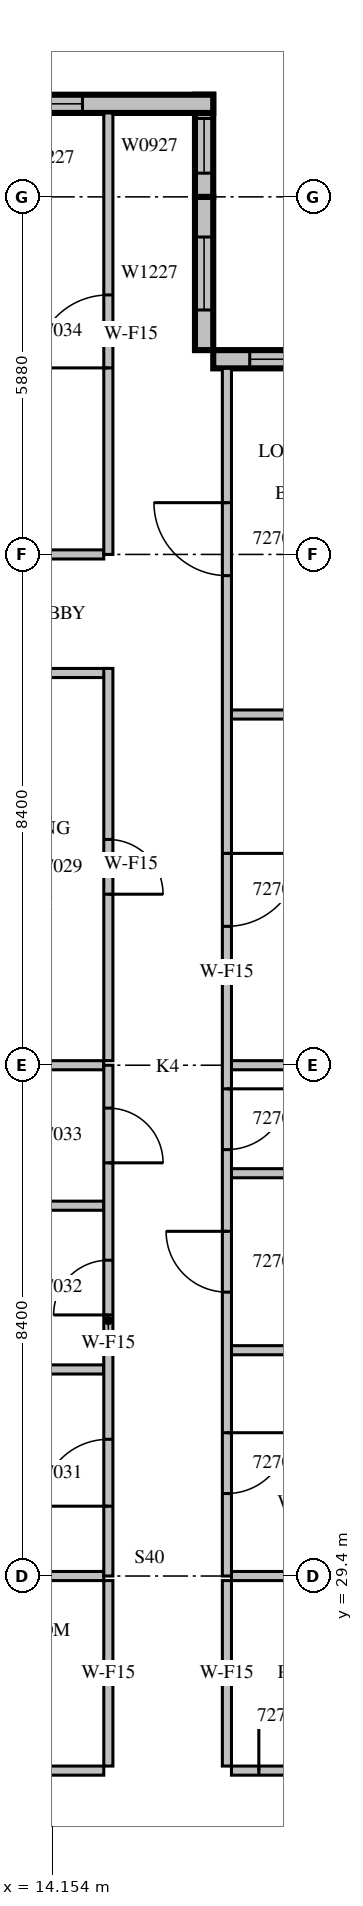
"""IFC4 building model, lengths in metres.
Left out: names, types, materials, properties, quantities, classifications, styles, units other than length and angle.
Written with IfcOpenShell. Run it as: python <this file> out.ifc"""

import sys

from ifc_helpers import new_model, si_unit, direction, frame, frame_2d, origin, place, context, subcontext, project, spatial, rectangle, extrude, source, transform, mapped, element, fill, save


model = new_model("IFC4")
c1 = context("Model", 3, precision=1e-05, world=origin(), true_north=direction((0.0, 1.0)))
c2 = subcontext(c1, "Body", "Model", "MODEL_VIEW")
j1 = project(units=[si_unit("LENGTHUNIT", "METRE"), si_unit("PLANEANGLEUNIT", "RADIAN")], contexts=[c1])
p1 = place(None, origin())
s1 = spatial("IfcSite", under=j1, at=p1, CompositionType="ELEMENT")
p2 = place(p1, origin())
s2 = spatial("IfcBuilding", under=s1, at=p2, CompositionType="ELEMENT")
p3 = place(p2, frame((0.0, 0.0, 124.5)))
s3 = spatial("IfcBuildingStorey", under=s2, at=p3, CompositionType="ELEMENT", Elevation=124.5)
m1 = source(origin(), c2, "Body", "SweptSolid", [
    extrude(rectangle(XDim=4.2, YDim=0.3, at=frame_2d((2.1, 0.0))), origin(), (0.0, 0.0, 1.0), 3.8),
])
p4 = place(p3, frame((21.0, 49.41, 0.0), z_axis=(0.0, 0.0, 1.0), x_axis=(-1.0, 0.0, 0.0)))
e1 = element("IfcWall", 1, at=p4, inside=s3, PredefinedType="STANDARD", context=c2, shape_type="MappedRepresentation", body=[
    mapped(m1, transform((0.0, 0.0, 0.0), scale=1.0)),
])
m2 = source(origin(), c2, "Body", "SweptSolid", [
    extrude(rectangle(XDim=3.0, YDim=2.7, at=frame_2d((1.5, 1.35))), frame((0.0, 0.16, 0.0), z_axis=(0.0, -1.0, 0.0), x_axis=(1.0, 0.0, 0.0)), (0.0, 0.0, 1.0), 0.32),
])
p5 = place(p4, frame((0.6, 0.0, 0.6)))
e2 = element("IfcOpeningElement", 2, at=p5, cuts=e1, PredefinedType="OPENING", context=c2, shape_type="MappedRepresentation", body=[
    mapped(m2, transform((0.0, 0.0, 0.0), scale=1.0)),
])
m3 = source(origin(), c2, "Body", "SweptSolid", [
    extrude(rectangle(XDim=2.52, YDim=0.3, at=frame_2d((1.26, 0.0))), origin(), (0.0, 0.0, 1.0), 3.8),
])
p6 = place(p3, frame((16.65, 49.56, 0.0), z_axis=(0.0, 0.0, 1.0), x_axis=(0.0, 1.0, 0.0)))
e3 = element("IfcWall", 3, at=p6, inside=s3, PredefinedType="STANDARD", context=c2, shape_type="MappedRepresentation", body=[
    mapped(m3, transform((0.0, 0.0, 0.0), scale=1.0)),
])
m4 = source(origin(), c2, "Body", "SweptSolid", [
    extrude(rectangle(XDim=1.2, YDim=2.7, at=frame_2d((0.6, 1.35))), frame((0.0, 0.16, 0.0), z_axis=(0.0, -1.0, 0.0), x_axis=(1.0, 0.0, 0.0)), (0.0, 0.0, 1.0), 0.32),
])
p7 = place(p6, frame((0.66, 0.0, 0.6)))
e4 = element("IfcOpeningElement", 4, at=p7, cuts=e3, PredefinedType="OPENING", context=c2, shape_type="MappedRepresentation", body=[
    mapped(m4, transform((0.0, 0.0, 0.0), scale=1.0)),
])
m5 = source(origin(), c2, "Body", "SweptSolid", [
    extrude(rectangle(XDim=1.68, YDim=0.3, at=frame_2d((0.84, 0.0))), origin(), (0.0, 0.0, 1.0), 3.8),
])
p8 = place(p3, frame((16.65, 52.08, 0.0), z_axis=(0.0, 0.0, 1.0), x_axis=(0.0, 1.0, 0.0)))
e5 = element("IfcWall", 5, at=p8, inside=s3, PredefinedType="STANDARD", context=c2, shape_type="MappedRepresentation", body=[
    mapped(m5, transform((0.0, 0.0, 0.0), scale=1.0)),
])
m6 = source(origin(), c2, "Body", "SweptSolid", [
    extrude(rectangle(XDim=0.9, YDim=2.7, at=frame_2d((0.45, 1.35))), frame((0.0, 0.16, 0.0), z_axis=(0.0, -1.0, 0.0), x_axis=(1.0, 0.0, 0.0)), (0.0, 0.0, 1.0), 0.32),
])
p9 = place(p8, frame((0.39, 0.0, 0.6)))
e6 = element("IfcOpeningElement", 6, at=p9, cuts=e5, PredefinedType="OPENING", context=c2, shape_type="MappedRepresentation", body=[
    mapped(m6, transform((0.0, 0.0, 0.0), scale=1.0)),
])
m7 = source(origin(), c2, "Body", "SweptSolid", [
    extrude(rectangle(XDim=10.5, YDim=0.3, at=frame_2d((5.25, 0.0))), origin(), (0.0, 0.0, 1.0), 3.8),
])
p10 = place(p3, frame((16.8, 53.61, 0.0), z_axis=(0.0, 0.0, 1.0), x_axis=(-1.0, 0.0, 0.0)))
e7 = element("IfcWall", 7, at=p10, inside=s3, PredefinedType="STANDARD", context=c2, shape_type="MappedRepresentation", body=[
    mapped(m7, transform((0.0, 0.0, 0.0), scale=1.0)),
])
p11 = place(p10, frame((2.15, 0.0, 0.6)))
e8 = element("IfcOpeningElement", 8, at=p11, cuts=e7, PredefinedType="OPENING", context=c2, shape_type="MappedRepresentation", body=[
    mapped(m4, transform((0.0, 0.0, 0.0), scale=1.0)),
])
m8 = source(origin(), c2, "Body", "SweptSolid", [
    extrude(rectangle(XDim=1.8, YDim=2.7, at=frame_2d((0.9, 1.35))), frame((0.0, 0.16, 0.0), z_axis=(0.0, -1.0, 0.0), x_axis=(1.0, 0.0, 0.0)), (0.0, 0.0, 1.0), 0.32),
])
p12 = place(p10, frame((8.025, 0.0, 0.6)))
e9 = element("IfcOpeningElement", 9, at=p12, cuts=e7, PredefinedType="OPENING", context=c2, shape_type="MappedRepresentation", body=[
    mapped(m8, transform((0.0, 0.0, 0.0), scale=1.0)),
])
m9 = source(origin(), c2, "Body", "SweptSolid", [
    extrude(rectangle(XDim=4.295, YDim=0.15, at=frame_2d((2.147, 0.0))), origin(), (0.0, 0.0, 1.0), 3.8),
])
p13 = place(p3, frame((10.705, 26.2, 0.0), z_axis=(0.0, 0.0, 1.0), x_axis=(1.0, 0.0, 0.0)))
e10 = element("IfcWall", 10, at=p13, inside=s3, PredefinedType="PARTITIONING", context=c2, shape_type="MappedRepresentation", body=[
    mapped(m9, transform((0.0, 0.0, 0.0), scale=1.0)),
])
m10 = source(origin(), c2, "Body", "SweptSolid", [
    extrude(rectangle(XDim=0.9, YDim=2.1, at=frame_2d((0.45, 1.05))), frame((0.0, 0.085, 0.0), z_axis=(0.0, -1.0, 0.0), x_axis=(1.0, 0.0, 0.0)), (0.0, 0.0, 1.0), 0.17),
])
p14 = place(p13, frame((2.283, 0.0, 0.0)))
e11 = element("IfcOpeningElement", 11, at=p14, cuts=e10, PredefinedType="OPENING", context=c2, shape_type="MappedRepresentation", body=[
    mapped(m10, transform((0.0, 0.0, 0.0), scale=1.0)),
])
m11 = source(origin(), c2, "Body", "SweptSolid", [
    extrude(rectangle(XDim=3.6, YDim=0.15, at=frame_2d((1.8, 0.0))), origin(), (0.0, 0.0, 1.0), 3.8),
])
p15 = place(p3, frame((17.1, 26.2, 0.0), z_axis=(0.0, 0.0, 1.0), x_axis=(1.0, 0.0, 0.0)))
e12 = element("IfcWall", 12, at=p15, inside=s3, PredefinedType="PARTITIONING", context=c2, shape_type="MappedRepresentation", body=[
    mapped(m11, transform((0.0, 0.0, 0.0), scale=1.0)),
])
p16 = place(p15, frame((0.45, 0.0, 0.0)))
e13 = element("IfcOpeningElement", 13, at=p16, cuts=e12, PredefinedType="OPENING", context=c2, shape_type="MappedRepresentation", body=[
    mapped(m10, transform((0.0, 0.0, 0.0), scale=1.0)),
])
m12 = source(origin(), c2, "Body", "SweptSolid", [
    extrude(rectangle(XDim=3.05, YDim=0.15, at=frame_2d((1.525, 0.0))), origin(), (0.0, 0.0, 1.0), 3.8),
])
for number, where, z_axis, x_axis in (
    (14, (15.075, 26.275, 0.0), (0.0, 0.0, 1.0), (0.0, 1.0, 0.0)),
    (15, (17.025, 29.325, 0.0), (0.0, 0.0, 1.0), (0.0, -1.0, 0.0)),
):
    element("IfcWall", number, at=place(p3, frame(where, z_axis=z_axis, x_axis=x_axis)), inside=s3, PredefinedType="PARTITIONING", context=c2, shape_type="MappedRepresentation", body=[
        mapped(m12, transform((0.0, 0.0, 0.0), scale=1.0)),
    ])
m13 = source(origin(), c2, "Body", "SweptSolid", [
    extrude(rectangle(XDim=3.976, YDim=0.15, at=frame_2d((1.988, 0.0))), origin(), (0.0, 0.0, 1.0), 3.8),
])
p17 = place(p3, frame((15.0, 29.4, 0.0), z_axis=(0.0, 0.0, 1.0), x_axis=(-1.0, 0.0, 0.0)))
e16 = element("IfcWall", 16, at=p17, inside=s3, PredefinedType="PARTITIONING", context=c2, shape_type="MappedRepresentation", body=[
    mapped(m13, transform((0.0, 0.0, 0.0), scale=1.0)),
])
m14 = source(origin(), c2, "Body", "SweptSolid", [
    extrude(rectangle(XDim=2.851, YDim=0.15, at=frame_2d((1.425, 0.0))), origin(), (0.0, 0.0, 1.0), 3.8),
])
p18 = place(p3, frame((19.951, 29.4, 0.0), z_axis=(0.0, 0.0, 1.0), x_axis=(-1.0, 0.0, 0.0)))
e17 = element("IfcWall", 17, at=p18, inside=s3, PredefinedType="PARTITIONING", context=c2, shape_type="MappedRepresentation", body=[
    mapped(m14, transform((0.0, 0.0, 0.0), scale=1.0)),
])
m15 = source(origin(), c2, "Body", "SweptSolid", [
    extrude(rectangle(XDim=2.775, YDim=0.15, at=frame_2d((1.387, 0.0))), origin(), (0.0, 0.0, 1.0), 3.8),
])
p19 = place(p3, frame((15.075, 44.25, 0.0), z_axis=(0.0, 0.0, 1.0), x_axis=(-1.0, 0.0, 0.0)))
e18 = element("IfcWall", 18, at=p19, inside=s3, PredefinedType="PARTITIONING", context=c2, shape_type="MappedRepresentation", body=[
    mapped(m15, transform((0.0, 0.0, 0.0), scale=1.0)),
])
m16 = source(origin(), c2, "Body", "SweptSolid", [
    extrude(rectangle(XDim=6.45, YDim=0.15, at=frame_2d((3.225, 0.0))), origin(), (0.0, 0.0, 1.0), 3.8),
])
p20 = place(p3, frame((15.075, 37.875, 0.0), z_axis=(0.0, 0.0, 1.0), x_axis=(0.0, 1.0, 0.0)))
e19 = element("IfcWall", 19, at=p20, inside=s3, PredefinedType="PARTITIONING", context=c2, shape_type="MappedRepresentation", body=[
    mapped(m16, transform((0.0, 0.0, 0.0), scale=1.0)),
])
p21 = place(p20, frame((2.737, 0.0, 0.0)))
e20 = element("IfcOpeningElement", 20, at=p21, cuts=e19, PredefinedType="OPENING", context=c2, shape_type="MappedRepresentation", body=[
    mapped(m10, transform((0.0, 0.0, 0.0), scale=1.0)),
])
for number, where, z_axis, x_axis in (
    (21, (15.0, 32.797, 0.0), (0.0, 0.0, 1.0), (-1.0, 0.0, 0.0)),
    (22, (15.0, 35.49, 0.0), (0.0, 0.0, 1.0), (-1.0, 0.0, 0.0)),
):
    element("IfcWall", number, at=place(p3, frame(where, z_axis=z_axis, x_axis=x_axis)), inside=s3, PredefinedType="PARTITIONING", context=c2, shape_type="MappedRepresentation", body=[
        mapped(m9, transform((0.0, 0.0, 0.0), scale=1.0)),
    ])
p22 = place(p3, frame((15.0, 37.8, 0.0), z_axis=(0.0, 0.0, 1.0), x_axis=(-1.0, 0.0, 0.0)))
e23 = element("IfcWall", 23, at=p22, inside=s3, PredefinedType="PARTITIONING", context=c2, shape_type="MappedRepresentation", body=[
    mapped(m13, transform((0.0, 0.0, 0.0), scale=1.0)),
])
m17 = source(origin(), c2, "Body", "SweptSolid", [
    extrude(rectangle(XDim=3.825, YDim=0.15, at=frame_2d((1.913, 0.0))), origin(), (0.0, 0.0, 1.0), 3.8),
])
p23 = place(p3, frame((15.0, 46.2, 0.0), z_axis=(0.0, 0.0, 1.0), x_axis=(-1.0, 0.0, 0.0)))
e24 = element("IfcWall", 24, at=p23, inside=s3, PredefinedType="PARTITIONING", context=c2, shape_type="MappedRepresentation", body=[
    mapped(m17, transform((0.0, 0.0, 0.0), scale=1.0)),
])
for number, where, z_axis, x_axis in (
    (25, (17.1, 33.113, 0.0), (0.0, 0.0, 1.0), (1.0, 0.0, 0.0)),
    (26, (17.1, 36.024, 0.0), (0.0, 0.0, 1.0), (1.0, 0.0, 0.0)),
    (27, (17.1, 43.568, 0.0), (0.0, 0.0, 1.0), (1.0, 0.0, 0.0)),
):
    element("IfcWall", number, at=place(p3, frame(where, z_axis=z_axis, x_axis=x_axis)), inside=s3, PredefinedType="PARTITIONING", context=c2, shape_type="MappedRepresentation", body=[
        mapped(m11, transform((0.0, 0.0, 0.0), scale=1.0)),
    ])
p24 = place(p3, frame((19.951, 37.8, 0.0), z_axis=(0.0, 0.0, 1.0), x_axis=(-1.0, 0.0, 0.0)))
e28 = element("IfcWall", 28, at=p24, inside=s3, PredefinedType="PARTITIONING", context=c2, shape_type="MappedRepresentation", body=[
    mapped(m14, transform((0.0, 0.0, 0.0), scale=1.0)),
])
m18 = source(origin(), c2, "Body", "SweptSolid", [
    extrude(rectangle(XDim=8.4, YDim=0.15, at=frame_2d((4.2, 0.0))), origin(), (0.0, 0.0, 1.0), 3.8),
])
p25 = place(p3, frame((15.075, 29.4, 0.0), z_axis=(0.0, 0.0, 1.0), x_axis=(0.0, 1.0, 0.0)))
e29 = element("IfcWall", 29, at=p25, inside=s3, PredefinedType="PARTITIONING", context=c2, shape_type="MappedRepresentation", body=[
    mapped(m18, transform((0.0, 0.0, 0.0), scale=1.0)),
])
m19 = source(origin(), c2, "Body", "SweptSolid", [
    extrude(rectangle(XDim=1.1, YDim=2.1, at=frame_2d((0.55, 1.05))), frame((0.0, 0.085, 0.0), z_axis=(0.0, -1.0, 0.0), x_axis=(1.0, 0.0, 0.0)), (0.0, 0.0, 1.0), 0.17),
])
p26 = place(p25, frame((1.149, 0.0, 0.0)))
e30 = element("IfcOpeningElement", 30, at=p26, cuts=e29, PredefinedType="OPENING", context=c2, shape_type="MappedRepresentation", body=[
    mapped(m19, transform((0.0, 0.0, 0.0), scale=1.0)),
])
p27 = place(p25, frame((4.293, 0.0, 0.0)))
e31 = element("IfcOpeningElement", 31, at=p27, cuts=e29, PredefinedType="OPENING", context=c2, shape_type="MappedRepresentation", body=[
    mapped(m10, transform((0.0, 0.0, 0.0), scale=1.0)),
])
p28 = place(p25, frame((6.795, 0.0, 0.0)))
e32 = element("IfcOpeningElement", 32, at=p28, cuts=e29, PredefinedType="OPENING", context=c2, shape_type="MappedRepresentation", body=[
    mapped(m10, transform((0.0, 0.0, 0.0), scale=1.0)),
])
m20 = source(origin(), c2, "Body", "SweptSolid", [
    extrude(rectangle(XDim=7.26, YDim=0.15, at=frame_2d((3.63, 0.0))), origin(), (0.0, 0.0, 1.0), 3.8),
])
p29 = place(p3, frame((15.075, 46.2, 0.0), z_axis=(0.0, 0.0, 1.0), x_axis=(0.0, 1.0, 0.0)))
e33 = element("IfcWall", 33, at=p29, inside=s3, PredefinedType="PARTITIONING", context=c2, shape_type="MappedRepresentation", body=[
    mapped(m20, transform((0.0, 0.0, 0.0), scale=1.0)),
])
m21 = source(origin(), c2, "Body", "SweptSolid", [
    extrude(rectangle(XDim=1.2, YDim=2.1, at=frame_2d((0.6, 1.05))), frame((0.0, 0.085, 0.0), z_axis=(0.0, -1.0, 0.0), x_axis=(1.0, 0.0, 0.0)), (0.0, 0.0, 1.0), 0.17),
])
p30 = place(p29, frame((3.067, 0.0, 0.0)))
e34 = element("IfcOpeningElement", 34, at=p30, cuts=e33, PredefinedType="OPENING", context=c2, shape_type="MappedRepresentation", body=[
    mapped(m21, transform((0.0, 0.0, 0.0), scale=1.0)),
])
m22 = source(origin(), c2, "Body", "SweptSolid", [
    extrude(rectangle(XDim=19.86, YDim=0.15, at=frame_2d((9.93, 0.0))), origin(), (0.0, 0.0, 1.0), 3.8),
])
p31 = place(p3, frame((17.025, 49.26, 0.0), z_axis=(0.0, 0.0, 1.0), x_axis=(0.0, -1.0, 0.0)))
e35 = element("IfcWall", 35, at=p31, inside=s3, PredefinedType="PARTITIONING", context=c2, shape_type="MappedRepresentation", body=[
    mapped(m22, transform((0.0, 0.0, 0.0), scale=1.0)),
])
m23 = source(origin(), c2, "Body", "SweptSolid", [
    extrude(rectangle(XDim=1.0, YDim=2.1, at=frame_2d((0.5, 1.05))), frame((0.0, 0.085, 0.0), z_axis=(0.0, -1.0, 0.0), x_axis=(1.0, 0.0, 0.0)), (0.0, 0.0, 1.0), 0.17),
])
p32 = place(p31, frame((17.503, 0.0, 0.0)))
e36 = element("IfcOpeningElement", 36, at=p32, cuts=e35, PredefinedType="OPENING", context=c2, shape_type="MappedRepresentation", body=[
    mapped(m23, transform((0.0, 0.0, 0.0), scale=1.0)),
])
p33 = place(p31, frame((14.191, 0.0, 0.0)))
e37 = element("IfcOpeningElement", 37, at=p33, cuts=e35, PredefinedType="OPENING", context=c2, shape_type="MappedRepresentation", body=[
    mapped(m23, transform((0.0, 0.0, 0.0), scale=1.0)),
])
p34 = place(p31, frame((11.848, 0.0, 0.0)))
e38 = element("IfcOpeningElement", 38, at=p34, cuts=e35, PredefinedType="OPENING", context=c2, shape_type="MappedRepresentation", body=[
    mapped(m23, transform((0.0, 0.0, 0.0), scale=1.0)),
])
p35 = place(p31, frame((7.976, 0.0, 0.0)))
e39 = element("IfcOpeningElement", 39, at=p35, cuts=e35, PredefinedType="OPENING", context=c2, shape_type="MappedRepresentation", body=[
    mapped(m21, transform((0.0, 0.0, 0.0), scale=1.0)),
])
p36 = place(p31, frame((2.209, 0.0, 0.0)))
e40 = element("IfcOpeningElement", 40, at=p36, cuts=e35, PredefinedType="OPENING", context=c2, shape_type="MappedRepresentation", body=[
    mapped(m21, transform((0.0, 0.0, 0.0), scale=1.0)),
])
m24 = source(origin(), c2, "Body", "SweptSolid", [
    extrude(rectangle(XDim=3.0, YDim=2.7, at=frame_2d((1.5, 1.35))), frame((0.0, 0.03, 0.0), z_axis=(0.0, -1.0, 0.0), x_axis=(1.0, 0.0, 0.0)), (0.0, 0.0, 1.0), 0.06),
])
p37 = place(p5, origin())
e41 = element("IfcWindow", 41, at=p37, inside=s3, PartitioningType="SINGLE_PANEL", PredefinedType="WINDOW", context=c2, shape_type="MappedRepresentation", body=[
    mapped(m24, transform((0.0, 0.0, 0.0), scale=1.0)),
])
fill(e2, e41)
m25 = source(origin(), c2, "Body", "SweptSolid", [
    extrude(rectangle(XDim=1.2, YDim=2.7, at=frame_2d((0.6, 1.35))), frame((0.0, 0.03, 0.0), z_axis=(0.0, -1.0, 0.0), x_axis=(1.0, 0.0, 0.0)), (0.0, 0.0, 1.0), 0.06),
])
p38 = place(p7, origin())
e42 = element("IfcWindow", 42, at=p38, inside=s3, PartitioningType="SINGLE_PANEL", PredefinedType="WINDOW", context=c2, shape_type="MappedRepresentation", body=[
    mapped(m25, transform((0.0, 0.0, 0.0), scale=1.0)),
])
fill(e4, e42)
m26 = source(origin(), c2, "Body", "SweptSolid", [
    extrude(rectangle(XDim=0.9, YDim=2.7, at=frame_2d((0.45, 1.35))), frame((0.0, 0.03, 0.0), z_axis=(0.0, -1.0, 0.0), x_axis=(1.0, 0.0, 0.0)), (0.0, 0.0, 1.0), 0.06),
])
p39 = place(p9, origin())
e43 = element("IfcWindow", 43, at=p39, inside=s3, PartitioningType="SINGLE_PANEL", PredefinedType="WINDOW", context=c2, shape_type="MappedRepresentation", body=[
    mapped(m26, transform((0.0, 0.0, 0.0), scale=1.0)),
])
fill(e6, e43)
p40 = place(p11, origin())
e44 = element("IfcWindow", 44, at=p40, inside=s3, PartitioningType="SINGLE_PANEL", PredefinedType="WINDOW", context=c2, shape_type="MappedRepresentation", body=[
    mapped(m25, transform((0.0, 0.0, 0.0), scale=1.0)),
])
fill(e8, e44)
m27 = source(origin(), c2, "Body", "SweptSolid", [
    extrude(rectangle(XDim=0.9, YDim=2.1, at=frame_2d((0.45, 1.05))), frame((0.0, 0.025, 0.0), z_axis=(0.0, -1.0, 0.0), x_axis=(1.0, 0.0, 0.0)), (0.0, 0.0, 1.0), 0.05),
])
p41 = place(p16, origin())
e45 = element("IfcDoor", 45, at=p41, inside=s3, OperationType="SINGLE_SWING_LEFT", PredefinedType="DOOR", context=c2, shape_type="MappedRepresentation", body=[
    mapped(m27, transform((0.0, 0.0, 0.0), scale=1.0)),
])
fill(e13, e45)
p42 = place(p21, origin())
e46 = element("IfcDoor", 46, at=p42, inside=s3, OperationType="SINGLE_SWING_RIGHT", PredefinedType="DOOR", context=c2, shape_type="MappedRepresentation", body=[
    mapped(m27, transform((0.0, 0.0, 0.0), scale=1.0)),
])
fill(e20, e46)
m28 = source(origin(), c2, "Body", "SweptSolid", [
    extrude(rectangle(XDim=1.1, YDim=2.1, at=frame_2d((0.55, 1.05))), frame((0.0, 0.025, 0.0), z_axis=(0.0, -1.0, 0.0), x_axis=(1.0, 0.0, 0.0)), (0.0, 0.0, 1.0), 0.05),
])
p43 = place(p26, origin())
e47 = element("IfcDoor", 47, at=p43, inside=s3, OperationType="SINGLE_SWING_LEFT", PredefinedType="DOOR", context=c2, shape_type="MappedRepresentation", body=[
    mapped(m28, transform((0.0, 0.0, 0.0), scale=1.0)),
])
fill(e30, e47)
p44 = place(p27, origin())
e48 = element("IfcDoor", 48, at=p44, inside=s3, OperationType="SINGLE_SWING_LEFT", PredefinedType="DOOR", context=c2, shape_type="MappedRepresentation", body=[
    mapped(m27, transform((0.0, 0.0, 0.0), scale=1.0)),
])
fill(e31, e48)
p45 = place(p28, origin())
e49 = element("IfcDoor", 49, at=p45, inside=s3, OperationType="SINGLE_SWING_RIGHT", PredefinedType="DOOR", context=c2, shape_type="MappedRepresentation", body=[
    mapped(m27, transform((0.0, 0.0, 0.0), scale=1.0)),
])
fill(e32, e49)
m29 = source(origin(), c2, "Body", "SweptSolid", [
    extrude(rectangle(XDim=1.2, YDim=2.1, at=frame_2d((0.6, 1.05))), frame((0.0, 0.025, 0.0), z_axis=(0.0, -1.0, 0.0), x_axis=(1.0, 0.0, 0.0)), (0.0, 0.0, 1.0), 0.05),
])
p46 = place(p30, origin())
e50 = element("IfcDoor", 50, at=p46, inside=s3, OperationType="SINGLE_SWING_LEFT", PredefinedType="DOOR", context=c2, shape_type="MappedRepresentation", body=[
    mapped(m29, transform((0.0, 0.0, 0.0), scale=1.0)),
])
fill(e34, e50)
m30 = source(origin(), c2, "Body", "SweptSolid", [
    extrude(rectangle(XDim=1.0, YDim=2.1, at=frame_2d((0.5, 1.05))), frame((0.0, 0.025, 0.0), z_axis=(0.0, -1.0, 0.0), x_axis=(1.0, 0.0, 0.0)), (0.0, 0.0, 1.0), 0.05),
])
p47 = place(p32, origin())
e51 = element("IfcDoor", 51, at=p47, inside=s3, OperationType="SINGLE_SWING_LEFT", PredefinedType="DOOR", context=c2, shape_type="MappedRepresentation", body=[
    mapped(m30, transform((0.0, 0.0, 0.0), scale=1.0)),
])
fill(e36, e51)
p48 = place(p33, origin())
e52 = element("IfcDoor", 52, at=p48, inside=s3, OperationType="SINGLE_SWING_RIGHT", PredefinedType="DOOR", context=c2, shape_type="MappedRepresentation", body=[
    mapped(m30, transform((0.0, 0.0, 0.0), scale=1.0)),
])
fill(e37, e52)
p49 = place(p34, origin())
e53 = element("IfcDoor", 53, at=p49, inside=s3, OperationType="SINGLE_SWING_LEFT", PredefinedType="DOOR", context=c2, shape_type="MappedRepresentation", body=[
    mapped(m30, transform((0.0, 0.0, 0.0), scale=1.0)),
])
fill(e38, e53)
p50 = place(p35, origin())
e54 = element("IfcDoor", 54, at=p50, inside=s3, OperationType="SINGLE_SWING_LEFT", PredefinedType="DOOR", context=c2, shape_type="MappedRepresentation", body=[
    mapped(m29, transform((0.0, 0.0, 0.0), scale=1.0)),
])
fill(e39, e54)
p51 = place(p36, origin())
e55 = element("IfcDoor", 55, at=p51, inside=s3, OperationType="SINGLE_SWING_RIGHT", PredefinedType="DOOR", context=c2, shape_type="MappedRepresentation", body=[
    mapped(m29, transform((0.0, 0.0, 0.0), scale=1.0)),
])
fill(e40, e55)
save(model, sys.argv[1])
